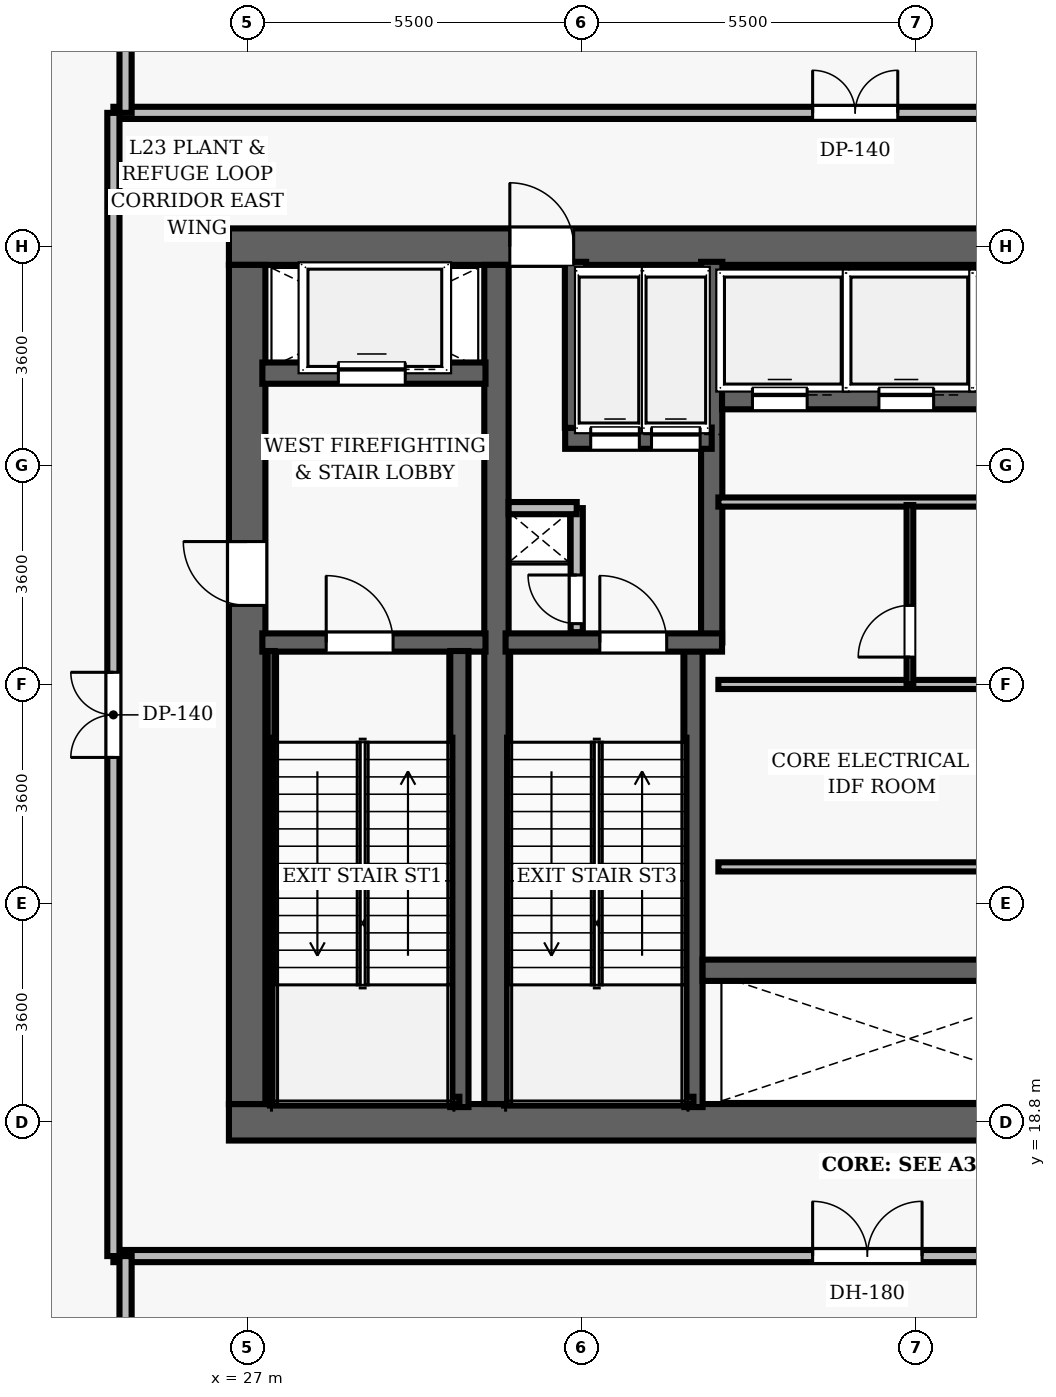
"""IFC4 building model, lengths in metres.
Left out: names, types, materials, properties, quantities, classifications, styles, units other than length and angle.
Written with IfcOpenShell. Run it as: python <this file> out.ifc"""

import sys

from ifc_helpers import new_model, si_unit, direction, frame, frame_2d, origin, place, context, subcontext, project, spatial, rectangle, extrude, element, fill, save


model = new_model("IFC4")
c1 = context("Model", 3, precision=1e-05, world=origin(), true_north=direction((0.0, 1.0)))
c2 = subcontext(c1, "Body", "Model", "MODEL_VIEW")
j1 = project(units=[si_unit("LENGTHUNIT", "METRE"), si_unit("PLANEANGLEUNIT", "RADIAN")], contexts=[c1])
p1 = place(None, origin())
s1 = spatial("IfcSite", under=j1, at=p1, CompositionType="ELEMENT")
p2 = place(p1, origin())
s2 = spatial("IfcBuilding", under=s1, at=p2, CompositionType="ELEMENT")
p3 = place(p2, frame((0.0, 0.0, 97.4)))
s3 = spatial("IfcBuildingStorey", under=s2, at=p3, CompositionType="ELEMENT", Elevation=97.4)
p4 = place(p3, frame((26.7, 18.8, 0.0), z_axis=(0.0, 0.0, 1.0), x_axis=(1.0, 0.0, 0.0)))
e1 = element("IfcWall", 1, at=p4, inside=s3, PredefinedType="SHEAR", context=c2, shape_type="SweptSolid", body=[
    extrude(rectangle(XDim=22.6, YDim=0.6, at=frame_2d((11.3, 0.0))), origin(), (0.0, 0.0, 1.0), 5.4),
])
p5 = place(p4, frame((14.52, 0.0, 0.0)))
e2 = element("IfcOpeningElement", 2, at=p5, cuts=e1, PredefinedType="OPENING", context=c2, shape_type="SweptSolid", body=[
    extrude(rectangle(XDim=1.05, YDim=2.15, at=frame_2d((0.525, 1.075))), frame((0.0, 0.31, 0.0), z_axis=(0.0, -1.0, 0.0), x_axis=(1.0, 0.0, 0.0)), (0.0, 0.0, 1.0), 0.62),
])
p6 = place(p3, frame((26.7, 33.2, 0.0), z_axis=(0.0, 0.0, 1.0), x_axis=(1.0, 0.0, 0.0)))
e3 = element("IfcWall", 3, at=p6, inside=s3, PredefinedType="SHEAR", context=c2, shape_type="SweptSolid", body=[
    extrude(rectangle(XDim=22.6, YDim=0.6, at=frame_2d((11.3, 0.0))), origin(), (0.0, 0.0, 1.0), 5.4),
])
p7 = place(p6, frame((4.62, 0.0, 0.0)))
e4 = element("IfcOpeningElement", 4, at=p7, cuts=e3, PredefinedType="OPENING", context=c2, shape_type="SweptSolid", body=[
    extrude(rectangle(XDim=1.05, YDim=2.15, at=frame_2d((0.525, 1.075))), frame((0.0, 0.31, 0.0), z_axis=(0.0, -1.0, 0.0), x_axis=(1.0, 0.0, 0.0)), (0.0, 0.0, 1.0), 0.62),
])
p8 = place(p6, frame((14.52, 0.0, 0.0)))
e5 = element("IfcOpeningElement", 5, at=p8, cuts=e3, PredefinedType="OPENING", context=c2, shape_type="SweptSolid", body=[
    extrude(rectangle(XDim=1.05, YDim=2.15, at=frame_2d((0.525, 1.075))), frame((0.0, 0.31, 0.0), z_axis=(0.0, -1.0, 0.0), x_axis=(1.0, 0.0, 0.0)), (0.0, 0.0, 1.0), 0.62),
])
p9 = place(p3, frame((27.0, 19.1, 0.0), z_axis=(0.0, 0.0, 1.0), x_axis=(0.0, 1.0, 0.0)))
e6 = element("IfcWall", 6, at=p9, inside=s3, PredefinedType="SHEAR", context=c2, shape_type="SweptSolid", body=[
    extrude(rectangle(XDim=13.8, YDim=0.6, at=frame_2d((6.9, 0.0))), origin(), (0.0, 0.0, 1.0), 5.4),
])
p10 = place(p9, frame((8.2, 0.0, 0.0)))
e7 = element("IfcOpeningElement", 7, at=p10, cuts=e6, PredefinedType="OPENING", context=c2, shape_type="SweptSolid", body=[
    extrude(rectangle(XDim=1.05, YDim=2.15, at=frame_2d((0.525, 1.075))), frame((0.0, 0.31, 0.0), z_axis=(0.0, -1.0, 0.0), x_axis=(1.0, 0.0, 0.0)), (0.0, 0.0, 1.0), 0.62),
])
p11 = place(p3, frame((31.1, 19.1, 0.0), z_axis=(0.0, 0.0, 1.0), x_axis=(0.0, 1.0, 0.0)))
e8 = element("IfcWall", 8, at=p11, inside=s3, PredefinedType="SHEAR", context=c2, shape_type="SweptSolid", body=[
    extrude(rectangle(XDim=13.8, YDim=0.4, at=frame_2d((6.9, 0.0))), origin(), (0.0, 0.0, 1.0), 5.4),
])
p12 = place(p3, frame((27.25, 26.69, 0.0), z_axis=(0.0, 0.0, 1.0), x_axis=(1.0, 0.0, 0.0)))
e9 = element("IfcWall", 9, at=p12, inside=s3, PredefinedType="SHEAR", context=c2, shape_type="SweptSolid", body=[
    extrude(rectangle(XDim=3.67, YDim=0.3, at=frame_2d((1.835, 0.0))), origin(), (0.0, 0.0, 1.0), 5.4),
])
p13 = place(p12, frame((1.05, 0.0, 0.0)))
e10 = element("IfcOpeningElement", 10, at=p13, cuts=e9, PredefinedType="OPENING", context=c2, shape_type="SweptSolid", body=[
    extrude(rectangle(XDim=1.1, YDim=2.15, at=frame_2d((0.55, 1.075))), frame((0.0, 0.16, 0.0), z_axis=(0.0, -1.0, 0.0), x_axis=(1.0, 0.0, 0.0)), (0.0, 0.0, 1.0), 0.32),
])
p14 = place(p3, frame((30.49, 19.05, 0.0), z_axis=(0.0, 0.0, 1.0), x_axis=(0.0, 1.0, 0.0)))
e11 = element("IfcWall", 11, at=p14, inside=s3, PredefinedType="SHEAR", context=c2, shape_type="SweptSolid", body=[
    extrude(rectangle(XDim=7.5, YDim=0.3, at=frame_2d((3.75, 0.0))), origin(), (0.0, 0.0, 1.0), 5.4),
])
p15 = place(p3, frame((27.395, 19.1, 0.0), z_axis=(0.0, 0.0, 1.0), x_axis=(0.0, 1.0, 0.0)))
e12 = element("IfcWall", 12, at=p15, inside=s3, PredefinedType="SHEAR", context=c2, shape_type="SweptSolid", body=[
    extrude(rectangle(XDim=7.45, YDim=0.12, at=frame_2d((3.725, 0.0))), origin(), (0.0, 0.0, 1.0), 5.4),
])
p16 = place(p3, frame((27.395, 19.16, 0.0), z_axis=(0.0, 0.0, 1.0), x_axis=(1.0, 0.0, 0.0)))
e13 = element("IfcWall", 13, at=p16, inside=s3, PredefinedType="SHEAR", context=c2, shape_type="SweptSolid", body=[
    extrude(rectangle(XDim=3.095, YDim=0.12, at=frame_2d((1.547, 0.0))), origin(), (0.0, 0.0, 1.0), 5.4),
])
p17 = place(p3, frame((27.25, 31.12, 0.0), z_axis=(0.0, 0.0, 1.0), x_axis=(1.0, 0.0, 0.0)))
e14 = element("IfcWall", 14, at=p17, inside=s3, PredefinedType="SHEAR", context=c2, shape_type="SweptSolid", body=[
    extrude(rectangle(XDim=3.67, YDim=0.35, at=frame_2d((1.835, 0.0))), origin(), (0.0, 0.0, 1.0), 4.04),
])
p18 = place(p17, frame((1.25, 0.0, 0.0)))
e15 = element("IfcOpeningElement", 15, at=p18, cuts=e14, PredefinedType="OPENING", context=c2, shape_type="SweptSolid", body=[
    extrude(rectangle(XDim=1.1, YDim=2.15, at=frame_2d((0.55, 1.075))), frame((0.0, 0.185, 0.0), z_axis=(0.0, -1.0, 0.0), x_axis=(1.0, 0.0, 0.0)), (0.0, 0.0, 1.0), 0.37),
])
p19 = place(p3, frame((34.34, 19.05, 0.0), z_axis=(0.0, 0.0, 1.0), x_axis=(0.0, 1.0, 0.0)))
e16 = element("IfcWall", 16, at=p19, inside=s3, PredefinedType="SHEAR", context=c2, shape_type="SweptSolid", body=[
    extrude(rectangle(XDim=7.5, YDim=0.3, at=frame_2d((3.75, 0.0))), origin(), (0.0, 0.0, 1.0), 5.4),
])
p20 = place(p3, frame((34.64, 26.69, 0.0), z_axis=(0.0, 0.0, 1.0), x_axis=(0.0, 1.0, 0.0)))
e17 = element("IfcWall", 17, at=p20, inside=s3, PredefinedType="SHEAR", context=c2, shape_type="SweptSolid", body=[
    extrude(rectangle(XDim=6.26, YDim=0.35, at=frame_2d((3.13, 0.0))), origin(), (0.0, 0.0, 1.0), 5.4),
])
p21 = place(p3, frame((31.25, 26.69, 0.0), z_axis=(0.0, 0.0, 1.0), x_axis=(1.0, 0.0, 0.0)))
e18 = element("IfcWall", 18, at=p21, inside=s3, PredefinedType="SHEAR", context=c2, shape_type="SweptSolid", body=[
    extrude(rectangle(XDim=3.56, YDim=0.3, at=frame_2d((1.78, 0.0))), origin(), (0.0, 0.0, 1.0), 5.4),
])
p22 = place(p21, frame((1.55, 0.0, 0.0)))
e19 = element("IfcOpeningElement", 19, at=p22, cuts=e18, PredefinedType="OPENING", context=c2, shape_type="SweptSolid", body=[
    extrude(rectangle(XDim=1.1, YDim=2.15, at=frame_2d((0.55, 1.075))), frame((0.0, 0.16, 0.0), z_axis=(0.0, -1.0, 0.0), x_axis=(1.0, 0.0, 0.0)), (0.0, 0.0, 1.0), 0.32),
])
p23 = place(p3, frame((31.3, 19.16, 0.0), z_axis=(0.0, 0.0, 1.0), x_axis=(1.0, 0.0, 0.0)))
e20 = element("IfcWall", 20, at=p23, inside=s3, PredefinedType="SHEAR", context=c2, shape_type="SweptSolid", body=[
    extrude(rectangle(XDim=3.04, YDim=0.12, at=frame_2d((1.52, 0.0))), origin(), (0.0, 0.0, 1.0), 5.4),
])
p24 = place(p3, frame((32.23, 30.05, 0.0), z_axis=(0.0, 0.0, 1.0), x_axis=(1.0, 0.0, 0.0)))
e21 = element("IfcWall", 21, at=p24, inside=s3, PredefinedType="SHEAR", context=c2, shape_type="SweptSolid", body=[
    extrude(rectangle(XDim=2.41, YDim=0.35, at=frame_2d((1.205, 0.0))), origin(), (0.0, 0.0, 1.0), 4.04),
])
p25 = place(p24, frame((0.42, 0.0, 0.0)))
e22 = element("IfcOpeningElement", 22, at=p25, cuts=e21, PredefinedType="OPENING", context=c2, shape_type="SweptSolid", body=[
    extrude(rectangle(XDim=0.8, YDim=2.15, at=frame_2d((0.4, 1.075))), frame((0.0, 0.185, 0.0), z_axis=(0.0, -1.0, 0.0), x_axis=(1.0, 0.0, 0.0)), (0.0, 0.0, 1.0), 0.37),
])
p26 = place(p24, frame((1.42, 0.0, 0.0)))
e23 = element("IfcOpeningElement", 23, at=p26, cuts=e21, PredefinedType="OPENING", context=c2, shape_type="SweptSolid", body=[
    extrude(rectangle(XDim=0.8, YDim=2.15, at=frame_2d((0.4, 1.075))), frame((0.0, 0.185, 0.0), z_axis=(0.0, -1.0, 0.0), x_axis=(1.0, 0.0, 0.0)), (0.0, 0.0, 1.0), 0.37),
])
p27 = place(p3, frame((32.4, 30.22, 0.0), z_axis=(0.0, 0.0, 1.0), x_axis=(0.0, 1.0, 0.0)))
e24 = element("IfcWall", 24, at=p27, inside=s3, PredefinedType="SHEAR", context=c2, shape_type="SweptSolid", body=[
    extrude(rectangle(XDim=2.73, YDim=0.35, at=frame_2d((1.365, 0.0))), origin(), (0.0, 0.0, 1.0), 4.04),
])
p28 = place(p3, frame((32.42, 26.86, 0.0), z_axis=(0.0, 0.0, 1.0), x_axis=(0.0, 1.0, 0.0)))
e25 = element("IfcWall", 25, at=p28, inside=s3, PredefinedType="PARTITIONING", context=c2, shape_type="SweptSolid", body=[
    extrude(rectangle(XDim=2.04, YDim=0.2, at=frame_2d((1.02, 0.0))), origin(), (0.0, 0.0, 1.0), 4.04),
])
p29 = place(p28, frame((0.14, 0.0, 0.0)))
e26 = element("IfcOpeningElement", 26, at=p29, cuts=e25, PredefinedType="OPENING", context=c2, shape_type="SweptSolid", body=[
    extrude(rectangle(XDim=0.8, YDim=2.05, at=frame_2d((0.4, 1.025))), frame((0.0, 0.11, 0.0), z_axis=(0.0, -1.0, 0.0), x_axis=(1.0, 0.0, 0.0)), (0.0, 0.0, 1.0), 0.22),
])
p30 = place(p3, frame((31.3, 28.9, 0.0), z_axis=(0.0, 0.0, 1.0), x_axis=(1.0, 0.0, 0.0)))
e27 = element("IfcWall", 27, at=p30, inside=s3, PredefinedType="PARTITIONING", context=c2, shape_type="SweptSolid", body=[
    extrude(rectangle(XDim=1.12, YDim=0.2, at=frame_2d((0.56, 0.0))), origin(), (0.0, 0.0, 1.0), 4.04),
])
p31 = place(p3, frame((34.81, 30.7, 0.0), z_axis=(0.0, 0.0, 1.0), x_axis=(1.0, 0.0, 0.0)))
e28 = element("IfcWall", 28, at=p31, inside=s3, PredefinedType="SHEAR", context=c2, shape_type="SweptSolid", body=[
    extrude(rectangle(XDim=6.36, YDim=0.35, at=frame_2d((3.18, 0.0))), origin(), (0.0, 0.0, 1.0), 4.04),
])
p32 = place(p31, frame((0.5, 0.0, 0.0)))
e29 = element("IfcOpeningElement", 29, at=p32, cuts=e28, PredefinedType="OPENING", context=c2, shape_type="SweptSolid", body=[
    extrude(rectangle(XDim=0.9, YDim=2.15, at=frame_2d((0.45, 1.075))), frame((0.0, 0.185, 0.0), z_axis=(0.0, -1.0, 0.0), x_axis=(1.0, 0.0, 0.0)), (0.0, 0.0, 1.0), 0.37),
])
p33 = place(p31, frame((2.58, 0.0, 0.0)))
e30 = element("IfcOpeningElement", 30, at=p33, cuts=e28, PredefinedType="OPENING", context=c2, shape_type="SweptSolid", body=[
    extrude(rectangle(XDim=0.9, YDim=2.15, at=frame_2d((0.45, 1.075))), frame((0.0, 0.185, 0.0), z_axis=(0.0, -1.0, 0.0), x_axis=(1.0, 0.0, 0.0)), (0.0, 0.0, 1.0), 0.37),
])
p34 = place(p31, frame((4.66, 0.0, 0.0)))
e31 = element("IfcOpeningElement", 31, at=p34, cuts=e28, PredefinedType="OPENING", context=c2, shape_type="SweptSolid", body=[
    extrude(rectangle(XDim=0.9, YDim=2.15, at=frame_2d((0.45, 1.075))), frame((0.0, 0.185, 0.0), z_axis=(0.0, -1.0, 0.0), x_axis=(1.0, 0.0, 0.0)), (0.0, 0.0, 1.0), 0.37),
])
p35 = place(p3, frame((34.49, 21.3, 0.0), z_axis=(0.0, 0.0, 1.0), x_axis=(1.0, 0.0, 0.0)))
e32 = element("IfcWall", 32, at=p35, inside=s3, PredefinedType="SHEAR", context=c2, shape_type="SweptSolid", body=[
    extrude(rectangle(XDim=6.68, YDim=0.35, at=frame_2d((3.34, 0.0))), origin(), (0.0, 0.0, 1.0), 4.04),
])
for number, where, z_axis, x_axis in (
    (33, (34.75, 29.0, 0.0), (0.0, 0.0, 1.0), (1.0, 0.0, 0.0)),
    (34, (34.75, 23.0, 0.0), (0.0, 0.0, 1.0), (1.0, 0.0, 0.0)),
    (35, (34.75, 26.0, 0.0), (0.0, 0.0, 1.0), (1.0, 0.0, 0.0)),
):
    element("IfcWall", number, at=place(p3, frame(where, z_axis=z_axis, x_axis=x_axis)), inside=s3, PredefinedType="PARTITIONING", context=c2, shape_type="SweptSolid", body=[
        extrude(rectangle(XDim=6.25, YDim=0.15, at=frame_2d((3.125, 0.0))), origin(), (0.0, 0.0, 1.0), 4.04),
    ])
p36 = place(p3, frame((37.9, 26.0, 0.0), z_axis=(0.0, 0.0, 1.0), x_axis=(0.0, 1.0, 0.0)))
e36 = element("IfcWall", 36, at=p36, inside=s3, PredefinedType="PARTITIONING", context=c2, shape_type="SweptSolid", body=[
    extrude(rectangle(XDim=2.95, YDim=0.11, at=frame_2d((1.475, 0.0))), origin(), (0.0, 0.0, 1.0), 4.04),
])
p37 = place(p36, frame((0.45, 0.0, 0.0)))
e37 = element("IfcOpeningElement", 37, at=p37, cuts=e36, PredefinedType="OPENING", context=c2, shape_type="SweptSolid", body=[
    extrude(rectangle(XDim=0.85, YDim=2.1, at=frame_2d((0.425, 1.05))), frame((0.0, 0.065, 0.0), z_axis=(0.0, -1.0, 0.0), x_axis=(1.0, 0.0, 0.0)), (0.0, 0.0, 1.0), 0.13),
])
p38 = place(p3, frame((24.8, 35.4, 0.0), z_axis=(0.0, 0.0, 1.0), x_axis=(1.0, 0.0, 0.0)))
e38 = element("IfcWall", 38, at=p38, inside=s3, PredefinedType="PARTITIONING", context=c2, shape_type="SweptSolid", body=[
    extrude(rectangle(XDim=26.4, YDim=0.2, at=frame_2d((13.2, 0.0))), origin(), (0.0, 0.0, 1.0), 4.04),
])
p39 = place(p38, frame((11.5, 0.0, 0.0)))
e39 = element("IfcOpeningElement", 39, at=p39, cuts=e38, PredefinedType="OPENING", context=c2, shape_type="SweptSolid", body=[
    extrude(rectangle(XDim=1.4, YDim=2.25, at=frame_2d((0.7, 1.125))), frame((0.0, 0.11, 0.0), z_axis=(0.0, -1.0, 0.0), x_axis=(1.0, 0.0, 0.0)), (0.0, 0.0, 1.0), 0.22),
])
p40 = place(p3, frame((24.8, 16.6, 0.0), z_axis=(0.0, 0.0, 1.0), x_axis=(1.0, 0.0, 0.0)))
e40 = element("IfcWall", 40, at=p40, inside=s3, PredefinedType="PARTITIONING", context=c2, shape_type="SweptSolid", body=[
    extrude(rectangle(XDim=26.4, YDim=0.2, at=frame_2d((13.2, 0.0))), origin(), (0.0, 0.0, 1.0), 4.04),
])
p41 = place(p40, frame((11.5, 0.0, 0.0)))
e41 = element("IfcOpeningElement", 41, at=p41, cuts=e40, PredefinedType="OPENING", context=c2, shape_type="SweptSolid", body=[
    extrude(rectangle(XDim=1.8, YDim=2.35, at=frame_2d((0.9, 1.175))), frame((0.0, 0.11, 0.0), z_axis=(0.0, -1.0, 0.0), x_axis=(1.0, 0.0, 0.0)), (0.0, 0.0, 1.0), 0.22),
])
p42 = place(p3, frame((24.8, 16.6, 0.0), z_axis=(0.0, 0.0, 1.0), x_axis=(0.0, 1.0, 0.0)))
e42 = element("IfcWall", 42, at=p42, inside=s3, PredefinedType="PARTITIONING", context=c2, shape_type="SweptSolid", body=[
    extrude(rectangle(XDim=18.8, YDim=0.2, at=frame_2d((9.4, 0.0))), origin(), (0.0, 0.0, 1.0), 4.04),
])
p43 = place(p42, frame((8.2, 0.0, 0.0)))
e43 = element("IfcOpeningElement", 43, at=p43, cuts=e42, PredefinedType="OPENING", context=c2, shape_type="SweptSolid", body=[
    extrude(rectangle(XDim=1.4, YDim=2.25, at=frame_2d((0.7, 1.125))), frame((0.0, 0.11, 0.0), z_axis=(0.0, -1.0, 0.0), x_axis=(1.0, 0.0, 0.0)), (0.0, 0.0, 1.0), 0.22),
])
p44 = place(p3, frame((25.0, 6.727, 0.0), z_axis=(0.0, 0.0, 1.0), x_axis=(0.0, 1.0, 0.0)))
e44 = element("IfcWall", 44, at=p44, inside=s3, PredefinedType="PARTITIONING", context=c2, shape_type="SweptSolid", body=[
    extrude(rectangle(XDim=9.873, YDim=0.2, at=frame_2d((4.937, 0.0))), origin(), (0.0, 0.0, 1.0), 4.04),
])
p45 = place(p3, frame((25.0, 35.4, 0.0), z_axis=(0.0, 0.0, 1.0), x_axis=(0.0, 1.0, 0.0)))
e45 = element("IfcWall", 45, at=p45, inside=s3, PredefinedType="PARTITIONING", context=c2, shape_type="SweptSolid", body=[
    extrude(rectangle(XDim=11.946, YDim=0.2, at=frame_2d((5.973, 0.0))), origin(), (0.0, 0.0, 1.0), 4.04),
])
p46 = place(p13, origin())
e46 = element("IfcDoor", 46, at=p46, inside=s3, OperationType="SINGLE_SWING_LEFT", PredefinedType="DOOR", context=c2, shape_type="SweptSolid", body=[
    extrude(rectangle(XDim=1.1, YDim=2.15, at=frame_2d((0.55, 1.075))), frame((0.0, 0.025, 0.0), z_axis=(0.0, -1.0, 0.0), x_axis=(1.0, 0.0, 0.0)), (0.0, 0.0, 1.0), 0.05),
])
fill(e10, e46)
p47 = place(p10, origin())
e47 = element("IfcDoor", 47, at=p47, inside=s3, OperationType="SINGLE_SWING_RIGHT", PredefinedType="DOOR", context=c2, shape_type="SweptSolid", body=[
    extrude(rectangle(XDim=1.05, YDim=2.15, at=frame_2d((0.525, 1.075))), frame((0.0, 0.025, 0.0), z_axis=(0.0, -1.0, 0.0), x_axis=(1.0, 0.0, 0.0)), (0.0, 0.0, 1.0), 0.05),
])
fill(e7, e47)
p48 = place(p22, origin())
e48 = element("IfcDoor", 48, at=p48, inside=s3, OperationType="SINGLE_SWING_LEFT", PredefinedType="DOOR", context=c2, shape_type="SweptSolid", body=[
    extrude(rectangle(XDim=1.1, YDim=2.15, at=frame_2d((0.55, 1.075))), frame((0.0, 0.025, 0.0), z_axis=(0.0, -1.0, 0.0), x_axis=(1.0, 0.0, 0.0)), (0.0, 0.0, 1.0), 0.05),
])
fill(e19, e48)
p49 = place(p29, origin())
e49 = element("IfcDoor", 49, at=p49, inside=s3, OperationType="SINGLE_SWING_RIGHT", PredefinedType="DOOR", context=c2, shape_type="SweptSolid", body=[
    extrude(rectangle(XDim=0.8, YDim=2.05, at=frame_2d((0.4, 1.025))), frame((0.0, 0.025, 0.0), z_axis=(0.0, -1.0, 0.0), x_axis=(1.0, 0.0, 0.0)), (0.0, 0.0, 1.0), 0.05),
])
fill(e26, e49)
p50 = place(p7, origin())
e50 = element("IfcDoor", 50, at=p50, inside=s3, OperationType="SINGLE_SWING_LEFT", PredefinedType="DOOR", context=c2, shape_type="SweptSolid", body=[
    extrude(rectangle(XDim=1.05, YDim=2.15, at=frame_2d((0.525, 1.075))), frame((0.0, 0.025, 0.0), z_axis=(0.0, -1.0, 0.0), x_axis=(1.0, 0.0, 0.0)), (0.0, 0.0, 1.0), 0.05),
])
fill(e4, e50)
p51 = place(p37, origin())
e51 = element("IfcDoor", 51, at=p51, inside=s3, OperationType="SINGLE_SWING_LEFT", PredefinedType="DOOR", context=c2, shape_type="SweptSolid", body=[
    extrude(rectangle(XDim=0.85, YDim=2.1, at=frame_2d((0.425, 1.05))), frame((0.0, 0.025, 0.0), z_axis=(0.0, -1.0, 0.0), x_axis=(1.0, 0.0, 0.0)), (0.0, 0.0, 1.0), 0.05),
])
fill(e37, e51)
p52 = place(p41, origin())
e52 = element("IfcDoor", 52, at=p52, inside=s3, OperationType="DOUBLE_DOOR_SINGLE_SWING", PredefinedType="DOOR", context=c2, shape_type="SweptSolid", body=[
    extrude(rectangle(XDim=1.8, YDim=2.35, at=frame_2d((0.9, 1.175))), frame((0.0, 0.025, 0.0), z_axis=(0.0, -1.0, 0.0), x_axis=(1.0, 0.0, 0.0)), (0.0, 0.0, 1.0), 0.05),
])
fill(e41, e52)
p53 = place(p39, origin())
e53 = element("IfcDoor", 53, at=p53, inside=s3, OperationType="DOUBLE_DOOR_SINGLE_SWING", PredefinedType="DOOR", context=c2, shape_type="SweptSolid", body=[
    extrude(rectangle(XDim=1.4, YDim=2.25, at=frame_2d((0.7, 1.125))), frame((0.0, 0.025, 0.0), z_axis=(0.0, -1.0, 0.0), x_axis=(1.0, 0.0, 0.0)), (0.0, 0.0, 1.0), 0.05),
])
fill(e39, e53)
p54 = place(p43, origin())
e54 = element("IfcDoor", 54, at=p54, inside=s3, OperationType="DOUBLE_DOOR_SINGLE_SWING", PredefinedType="DOOR", context=c2, shape_type="SweptSolid", body=[
    extrude(rectangle(XDim=1.4, YDim=2.25, at=frame_2d((0.7, 1.125))), frame((0.0, 0.025, 0.0), z_axis=(0.0, -1.0, 0.0), x_axis=(1.0, 0.0, 0.0)), (0.0, 0.0, 1.0), 0.05),
])
fill(e43, e54)
p55 = place(p32, origin())
e55 = element("IfcDoor", 55, at=p55, inside=s3, OperationType="SLIDING_TO_LEFT", PredefinedType="DOOR", context=c2, shape_type="SweptSolid", body=[
    extrude(rectangle(XDim=0.9, YDim=2.15, at=frame_2d((0.45, 1.075))), frame((0.0, 0.025, 0.0), z_axis=(0.0, -1.0, 0.0), x_axis=(1.0, 0.0, 0.0)), (0.0, 0.0, 1.0), 0.05),
])
fill(e29, e55)
p56 = place(p33, origin())
e56 = element("IfcDoor", 56, at=p56, inside=s3, OperationType="SLIDING_TO_LEFT", PredefinedType="DOOR", context=c2, shape_type="SweptSolid", body=[
    extrude(rectangle(XDim=0.9, YDim=2.15, at=frame_2d((0.45, 1.075))), frame((0.0, 0.025, 0.0), z_axis=(0.0, -1.0, 0.0), x_axis=(1.0, 0.0, 0.0)), (0.0, 0.0, 1.0), 0.05),
])
fill(e30, e56)
p57 = place(p18, origin())
e57 = element("IfcDoor", 57, at=p57, inside=s3, OperationType="SLIDING_TO_LEFT", PredefinedType="DOOR", context=c2, shape_type="SweptSolid", body=[
    extrude(rectangle(XDim=1.1, YDim=2.15, at=frame_2d((0.55, 1.075))), frame((0.0, 0.025, 0.0), z_axis=(0.0, -1.0, 0.0), x_axis=(1.0, 0.0, 0.0)), (0.0, 0.0, 1.0), 0.05),
])
fill(e15, e57)
p58 = place(p25, origin())
e58 = element("IfcDoor", 58, at=p58, inside=s3, OperationType="SLIDING_TO_LEFT", PredefinedType="DOOR", context=c2, shape_type="SweptSolid", body=[
    extrude(rectangle(XDim=0.8, YDim=2.15, at=frame_2d((0.4, 1.075))), frame((0.0, 0.025, 0.0), z_axis=(0.0, -1.0, 0.0), x_axis=(1.0, 0.0, 0.0)), (0.0, 0.0, 1.0), 0.05),
])
fill(e22, e58)
p59 = place(p26, origin())
e59 = element("IfcDoor", 59, at=p59, inside=s3, OperationType="SLIDING_TO_LEFT", PredefinedType="DOOR", context=c2, shape_type="SweptSolid", body=[
    extrude(rectangle(XDim=0.8, YDim=2.15, at=frame_2d((0.4, 1.075))), frame((0.0, 0.025, 0.0), z_axis=(0.0, -1.0, 0.0), x_axis=(1.0, 0.0, 0.0)), (0.0, 0.0, 1.0), 0.05),
])
fill(e23, e59)
save(model, sys.argv[1])
